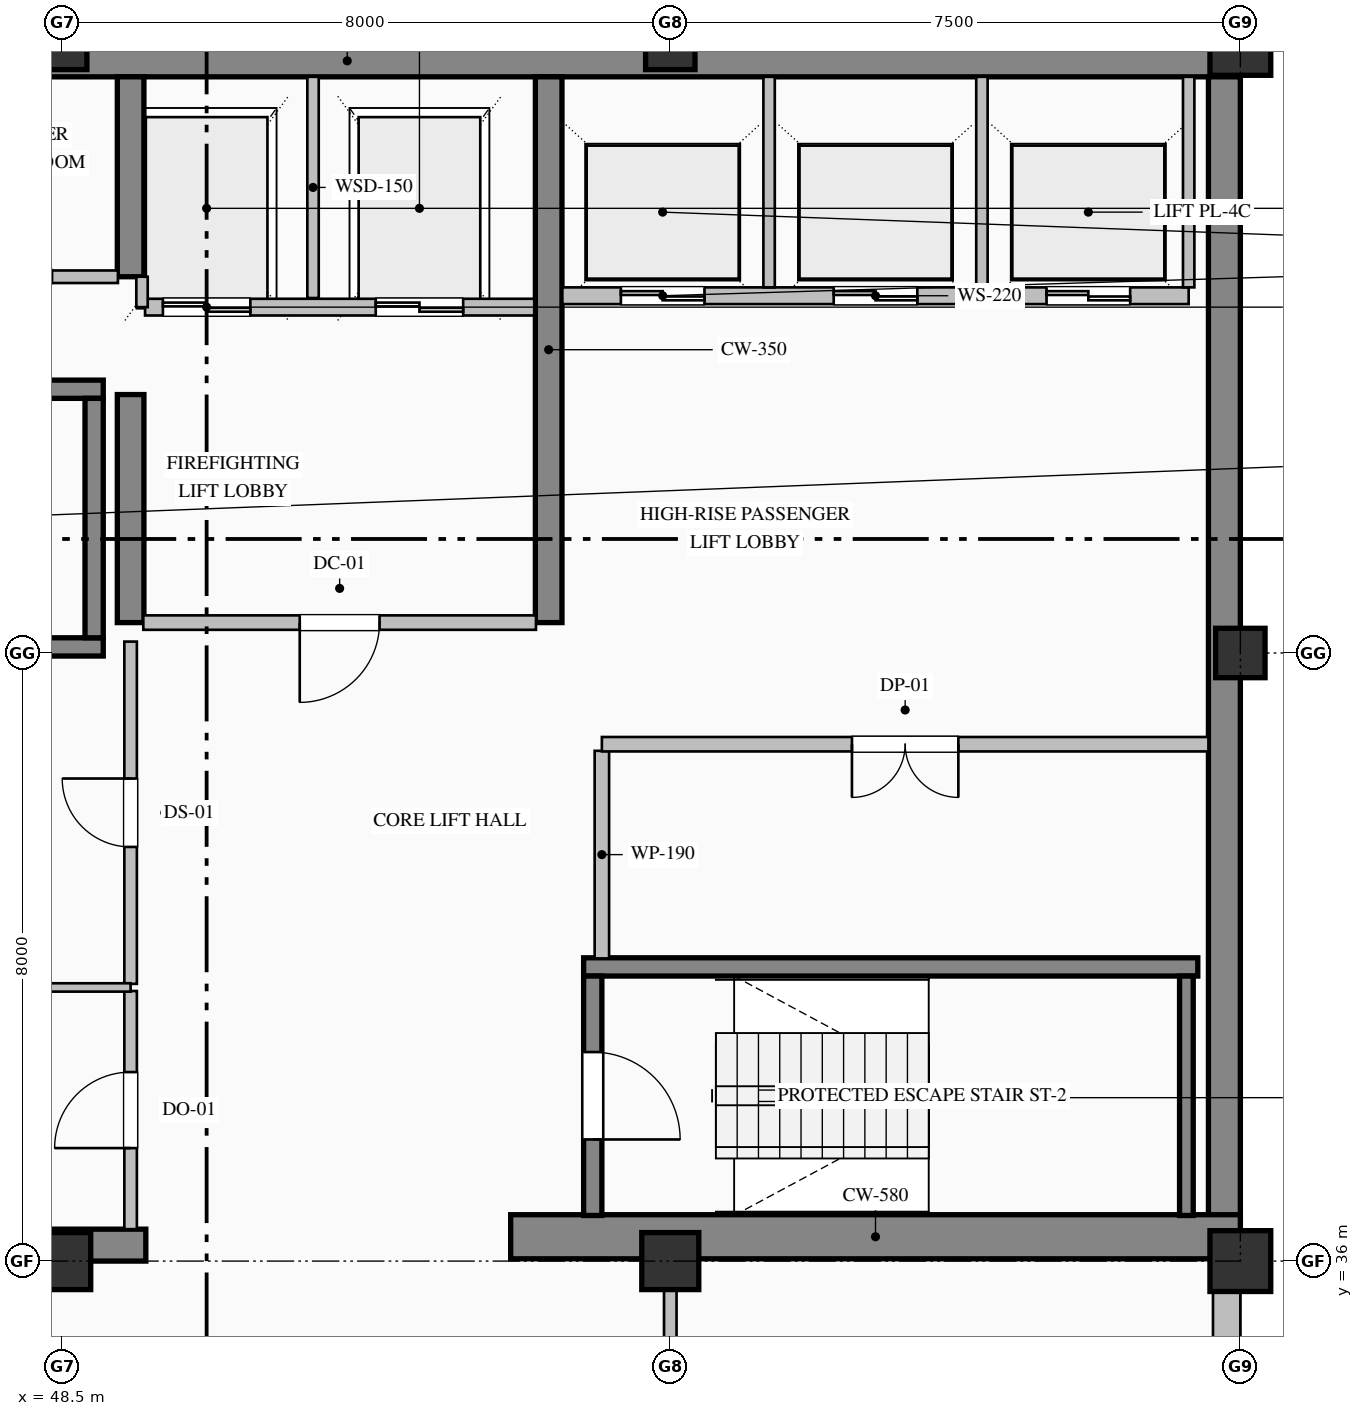
"""IFC4 building model, lengths in metres.
Left out: names, types, materials, properties, quantities, classifications, styles, units other than length and angle.
Written with IfcOpenShell. Run it as: python <this file> out.ifc"""

import sys

from ifc_helpers import new_model, si_unit, direction, frame, frame_2d, origin, origin_2d, place, context, subcontext, project, spatial, rectangle, hollow_rectangle, extrude, element, fill, save


model = new_model("IFC4")
c1 = context("Model", 3, precision=1e-05, world=origin(), true_north=direction((0.0, 1.0)))
c2 = subcontext(c1, "Body", "Model", "MODEL_VIEW")
j1 = project(units=[si_unit("LENGTHUNIT", "METRE"), si_unit("PLANEANGLEUNIT", "RADIAN")], contexts=[c1])
p1 = place(None, origin())
s1 = spatial("IfcSite", under=j1, at=p1, CompositionType="ELEMENT")
p2 = place(p1, origin())
s2 = spatial("IfcBuilding", under=s1, at=p2, CompositionType="ELEMENT")
p3 = place(p2, frame((0.0, 0.0, 319.2)))
s3 = spatial("IfcBuildingStorey", under=s2, at=p3, CompositionType="ELEMENT", Elevation=319.2)
p4 = place(p3, frame((40.5, 51.79, 0.0), z_axis=(0.0, 0.0, 1.0), x_axis=(1.0, 0.0, 0.0)))
e1 = element("IfcWall", 1, at=p4, inside=s3, PredefinedType="SHEAR", context=c2, shape_type="SweptSolid", body=[
    extrude(rectangle(XDim=23.5, YDim=0.42, at=frame_2d((11.75, 0.0))), origin(), (0.0, 0.0, 1.0), 3.785),
])
p5 = place(p3, frame((63.79, 36.32, 0.0), z_axis=(0.0, 0.0, 1.0), x_axis=(0.0, 1.0, 0.0)))
e2 = element("IfcWall", 2, at=p5, inside=s3, PredefinedType="SHEAR", context=c2, shape_type="SweptSolid", body=[
    extrude(rectangle(XDim=15.26, YDim=0.42, at=frame_2d((7.63, 0.0))), origin(), (0.0, 0.0, 1.0), 3.785),
])
p6 = place(p3, frame((40.5, 36.21, 0.0), z_axis=(0.0, 0.0, 1.0), x_axis=(1.0, 0.0, 0.0)))
e3 = element("IfcWall", 3, at=p6, inside=s3, PredefinedType="SHEAR", context=c2, shape_type="SweptSolid", body=[
    extrude(rectangle(XDim=9.1, YDim=0.42, at=frame_2d((4.55, 0.0))), origin(), (0.0, 0.0, 1.0), 3.785),
])
p7 = place(p3, frame((54.4, 36.32, 0.0), z_axis=(0.0, 0.0, 1.0), x_axis=(1.0, 0.0, 0.0)))
e4 = element("IfcWall", 4, at=p7, inside=s3, PredefinedType="SHEAR", context=c2, shape_type="SweptSolid", body=[
    extrude(rectangle(XDim=9.6, YDim=0.58, at=frame_2d((4.8, 0.0))), origin(), (0.0, 0.0, 1.0), 4.0),
])
p8 = place(p3, frame((49.4, 44.4, 0.0), z_axis=(0.0, 0.0, 1.0), x_axis=(0.0, 1.0, 0.0)))
e5 = element("IfcWall", 5, at=p8, inside=s3, PredefinedType="SHEAR", context=c2, shape_type="SweptSolid", body=[
    extrude(rectangle(XDim=3.0, YDim=0.35, at=frame_2d((1.5, 0.0))), origin(), (0.0, 0.0, 1.0), 3.785),
])
p9 = place(p3, frame((49.4, 48.95, 0.0), z_axis=(0.0, 0.0, 1.0), x_axis=(0.0, 1.0, 0.0)))
e6 = element("IfcWall", 6, at=p9, inside=s3, PredefinedType="SHEAR", context=c2, shape_type="SweptSolid", body=[
    extrude(rectangle(XDim=2.63, YDim=0.35, at=frame_2d((1.315, 0.0))), origin(), (0.0, 0.0, 1.0), 3.785),
])
p10 = place(p3, frame((54.9, 44.4, 0.0), z_axis=(0.0, 0.0, 1.0), x_axis=(0.0, 1.0, 0.0)))
e7 = element("IfcWall", 7, at=p10, inside=s3, PredefinedType="SHEAR", context=c2, shape_type="SweptSolid", body=[
    extrude(rectangle(XDim=7.18, YDim=0.35, at=frame_2d((3.59, 0.0))), origin(), (0.0, 0.0, 1.0), 3.785),
])
p11 = place(p3, frame((48.5, 36.0, 0.0), z_axis=(0.0, 0.0, 1.0), x_axis=(1.0, 0.0, 0.0)))
e8 = element("IfcColumn", 8, at=p11, inside=s3, PredefinedType="COLUMN", context=c2, shape_type="SweptSolid", body=[
    extrude(rectangle(XDim=0.75, YDim=0.75, at=origin_2d()), origin(), (0.0, 0.0, 1.0), 4.0),
])
p12 = place(p3, frame((48.5, 52.0, 0.0), z_axis=(0.0, 0.0, 1.0), x_axis=(1.0, 0.0, 0.0)))
e9 = element("IfcColumn", 9, at=p12, inside=s3, PredefinedType="COLUMN", context=c2, shape_type="SweptSolid", body=[
    extrude(hollow_rectangle(XDim=0.65, YDim=0.65, WallThickness=0.028, at=origin_2d()), origin(), (0.0, 0.0, 1.0), 4.0),
])
p13 = place(p3, frame((56.5, 36.0, 0.0), z_axis=(0.0, 0.0, 1.0), x_axis=(1.0, 0.0, 0.0)))
e10 = element("IfcColumn", 10, at=p13, inside=s3, PredefinedType="COLUMN", context=c2, shape_type="SweptSolid", body=[
    extrude(rectangle(XDim=0.75, YDim=0.75, at=origin_2d()), origin(), (0.0, 0.0, 1.0), 4.0),
])
p14 = place(p3, frame((56.5, 52.0, 0.0), z_axis=(0.0, 0.0, 1.0), x_axis=(1.0, 0.0, 0.0)))
e11 = element("IfcColumn", 11, at=p14, inside=s3, PredefinedType="COLUMN", context=c2, shape_type="SweptSolid", body=[
    extrude(hollow_rectangle(XDim=0.65, YDim=0.65, WallThickness=0.028, at=origin_2d()), origin(), (0.0, 0.0, 1.0), 4.0),
])
p15 = place(p3, frame((64.0, 36.0, 0.0), z_axis=(0.0, 0.0, 1.0), x_axis=(1.0, 0.0, 0.0)))
e12 = element("IfcColumn", 12, at=p15, inside=s3, PredefinedType="COLUMN", context=c2, shape_type="SweptSolid", body=[
    extrude(hollow_rectangle(XDim=0.8, YDim=0.8, WallThickness=0.032, at=origin_2d()), origin(), (0.0, 0.0, 1.0), 4.0),
])
p16 = place(p3, frame((64.0, 44.0, 0.0), z_axis=(0.0, 0.0, 1.0), x_axis=(1.0, 0.0, 0.0)))
e13 = element("IfcColumn", 13, at=p16, inside=s3, PredefinedType="COLUMN", context=c2, shape_type="SweptSolid", body=[
    extrude(hollow_rectangle(XDim=0.65, YDim=0.65, WallThickness=0.028, at=origin_2d()), origin(), (0.0, 0.0, 1.0), 4.0),
])
p17 = place(p3, frame((64.0, 52.0, 0.0), z_axis=(0.0, 0.0, 1.0), x_axis=(1.0, 0.0, 0.0)))
e14 = element("IfcColumn", 14, at=p17, inside=s3, PredefinedType="COLUMN", context=c2, shape_type="SweptSolid", body=[
    extrude(hollow_rectangle(XDim=0.8, YDim=0.8, WallThickness=0.032, at=origin_2d()), origin(), (0.0, 0.0, 1.0), 4.0),
])
p18 = place(p3, frame((63.82, 36.05, 0.0), z_axis=(0.0, 0.0, 1.0), x_axis=(0.0, -1.0, 0.0)))
e15 = element("IfcWall", 15, at=p18, inside=s3, PredefinedType="SOLIDWALL", context=c2, shape_type="SweptSolid", body=[
    extrude(rectangle(XDim=13.55, YDim=0.36, at=frame_2d((6.775, 0.0))), origin(), (0.0, 0.0, 1.0), 3.335),
])
p19 = place(p18, frame((2.925, 0.0, 0.9)))
e16 = element("IfcOpeningElement", 16, at=p19, cuts=e15, PredefinedType="OPENING", context=c2, shape_type="SweptSolid", body=[
    extrude(rectangle(XDim=1.35, YDim=1.85, at=frame_2d((0.675, 0.925))), frame((0.0, 0.19, 0.0), z_axis=(0.0, -1.0, 0.0), x_axis=(1.0, 0.0, 0.0)), (0.0, 0.0, 1.0), 0.38),
])
for number, where, z_axis, x_axis in (
    (17, (40.96, 47.47, 0.0), (0.0, 0.0, 1.0), (1.0, 0.0, 0.0)),
    (18, (49.04, 44.08, 0.0), (0.0, 0.0, 1.0), (-1.0, 0.0, 0.0)),
):
    element("IfcWall", number, at=place(p3, frame(where, z_axis=z_axis, x_axis=x_axis)), inside=s3, PredefinedType="SOLIDWALL", context=c2, shape_type="SweptSolid", body=[
        extrude(rectangle(XDim=8.08, YDim=0.24, at=frame_2d((4.04, 0.0))), origin(), (0.0, 0.0, 1.0), 4.0),
    ])
p20 = place(p3, frame((48.92, 44.2, 0.0), z_axis=(0.0, 0.0, 1.0), x_axis=(0.0, 1.0, 0.0)))
e19 = element("IfcWall", 19, at=p20, inside=s3, PredefinedType="SOLIDWALL", context=c2, shape_type="SweptSolid", body=[
    extrude(rectangle(XDim=3.15, YDim=0.24, at=frame_2d((1.575, 0.0))), origin(), (0.0, 0.0, 1.0), 4.0),
])
p21 = place(p3, frame((55.36, 39.87, 0.0), z_axis=(0.0, 0.0, 1.0), x_axis=(1.0, 0.0, 0.0)))
e20 = element("IfcWall", 20, at=p21, inside=s3, PredefinedType="SOLIDWALL", context=c2, shape_type="SweptSolid", body=[
    extrude(rectangle(XDim=8.08, YDim=0.24, at=frame_2d((4.04, 0.0))), origin(), (0.0, 0.0, 1.0), 4.0),
])
p22 = place(p3, frame((55.48, 39.75, 0.0), z_axis=(0.0, 0.0, 1.0), x_axis=(0.0, -1.0, 0.0)))
e21 = element("IfcWall", 21, at=p22, inside=s3, PredefinedType="SOLIDWALL", context=c2, shape_type="SweptSolid", body=[
    extrude(rectangle(XDim=3.15, YDim=0.24, at=frame_2d((1.575, 0.0))), origin(), (0.0, 0.0, 1.0), 4.0),
])
p23 = place(p22, frame((1.0, 0.0, 0.0)))
e22 = element("IfcOpeningElement", 22, at=p23, cuts=e21, PredefinedType="OPENING", context=c2, shape_type="SweptSolid", body=[
    extrude(rectangle(XDim=1.15, YDim=2.2, at=frame_2d((0.575, 1.1))), frame((0.0, 0.13, 0.0), z_axis=(0.0, -1.0, 0.0), x_axis=(1.0, 0.0, 0.0)), (0.0, 0.0, 1.0), 0.26),
])
p24 = place(p3, frame((63.29, 36.6, 0.0), z_axis=(0.0, 0.0, 1.0), x_axis=(0.0, 1.0, 0.0)))
e23 = element("IfcWall", 23, at=p24, inside=s3, PredefinedType="SOLIDWALL", context=c2, shape_type="SweptSolid", body=[
    extrude(rectangle(XDim=3.15, YDim=0.18, at=frame_2d((1.575, 0.0))), origin(), (0.0, 0.0, 1.0), 4.0),
])
p25 = place(p3, frame((54.71, 48.55, 0.0), z_axis=(0.0, 0.0, 1.0), x_axis=(-1.0, 0.0, 0.0)))
e24 = element("IfcWall", 24, at=p25, inside=s3, PredefinedType="PARTITIONING", context=c2, shape_type="SweptSolid", body=[
    extrude(rectangle(XDim=5.12, YDim=0.22, at=frame_2d((2.56, 0.0))), origin(), (0.0, 0.0, 1.0), 3.785),
])
p26 = place(p25, frame((3.735, 0.0, 0.0)))
e25 = element("IfcOpeningElement", 25, at=p26, cuts=e24, PredefinedType="OPENING", context=c2, shape_type="SweptSolid", body=[
    extrude(rectangle(XDim=1.15, YDim=2.2, at=frame_2d((0.575, 1.1))), frame((0.0, 0.12, 0.0), z_axis=(0.0, -1.0, 0.0), x_axis=(1.0, 0.0, 0.0)), (0.0, 0.0, 1.0), 0.24),
])
p27 = place(p25, frame((0.935, 0.0, 0.0)))
e26 = element("IfcOpeningElement", 26, at=p27, cuts=e24, PredefinedType="OPENING", context=c2, shape_type="SweptSolid", body=[
    extrude(rectangle(XDim=1.15, YDim=2.2, at=frame_2d((0.575, 1.1))), frame((0.0, 0.12, 0.0), z_axis=(0.0, -1.0, 0.0), x_axis=(1.0, 0.0, 0.0)), (0.0, 0.0, 1.0), 0.24),
])
p28 = place(p3, frame((51.8, 48.67, 0.0), z_axis=(0.0, 0.0, 1.0), x_axis=(0.0, 1.0, 0.0)))
e27 = element("IfcWall", 27, at=p28, inside=s3, PredefinedType="PARTITIONING", context=c2, shape_type="SweptSolid", body=[
    extrude(rectangle(XDim=2.91, YDim=0.15, at=frame_2d((1.455, 0.0))), origin(), (0.0, 0.0, 1.0), 3.785),
])
p29 = place(p3, frame((49.55, 48.55, 0.0), z_axis=(0.0, 0.0, 1.0), x_axis=(0.0, 1.0, 0.0)))
e28 = element("IfcWall", 28, at=p29, inside=s3, PredefinedType="PARTITIONING", context=c2, shape_type="SweptSolid", body=[
    extrude(rectangle(XDim=0.4, YDim=0.15, at=frame_2d((0.2, 0.0))), origin(), (0.0, 0.0, 1.0), 3.785),
])
p30 = place(p3, frame((63.32, 48.7, 0.0), z_axis=(0.0, 0.0, 1.0), x_axis=(-1.0, 0.0, 0.0)))
e29 = element("IfcWall", 29, at=p30, inside=s3, PredefinedType="PARTITIONING", context=c2, shape_type="SweptSolid", body=[
    extrude(rectangle(XDim=8.24, YDim=0.22, at=frame_2d((4.12, 0.0))), origin(), (0.0, 0.0, 1.0), 3.785),
])
p31 = place(p30, frame((6.37, 0.0, 0.0)))
e30 = element("IfcOpeningElement", 30, at=p31, cuts=e29, PredefinedType="OPENING", context=c2, shape_type="SweptSolid", body=[
    extrude(rectangle(XDim=1.1, YDim=2.2, at=frame_2d((0.55, 1.1))), frame((0.0, 0.12, 0.0), z_axis=(0.0, -1.0, 0.0), x_axis=(1.0, 0.0, 0.0)), (0.0, 0.0, 1.0), 0.24),
])
p32 = place(p30, frame((3.57, 0.0, 0.0)))
e31 = element("IfcOpeningElement", 31, at=p32, cuts=e29, PredefinedType="OPENING", context=c2, shape_type="SweptSolid", body=[
    extrude(rectangle(XDim=1.1, YDim=2.2, at=frame_2d((0.55, 1.1))), frame((0.0, 0.12, 0.0), z_axis=(0.0, -1.0, 0.0), x_axis=(1.0, 0.0, 0.0)), (0.0, 0.0, 1.0), 0.24),
])
p33 = place(p30, frame((0.77, 0.0, 0.0)))
e32 = element("IfcOpeningElement", 32, at=p33, cuts=e29, PredefinedType="OPENING", context=c2, shape_type="SweptSolid", body=[
    extrude(rectangle(XDim=1.1, YDim=2.2, at=frame_2d((0.55, 1.1))), frame((0.0, 0.12, 0.0), z_axis=(0.0, -1.0, 0.0), x_axis=(1.0, 0.0, 0.0)), (0.0, 0.0, 1.0), 0.24),
])
for number, where, z_axis, x_axis in (
    (33, (57.8, 48.81, 0.0), (0.0, 0.0, 1.0), (0.0, 1.0, 0.0)),
    (34, (60.6, 48.81, 0.0), (0.0, 0.0, 1.0), (0.0, 1.0, 0.0)),
    (35, (63.32, 48.81, 0.0), (0.0, 0.0, 1.0), (0.0, 1.0, 0.0)),
):
    element("IfcWall", number, at=place(p3, frame(where, z_axis=z_axis, x_axis=x_axis)), inside=s3, PredefinedType="PARTITIONING", context=c2, shape_type="SweptSolid", body=[
        extrude(rectangle(XDim=2.77, YDim=0.15, at=frame_2d((1.385, 0.0))), origin(), (0.0, 0.0, 1.0), 3.785),
    ])
p34 = place(p3, frame((46.6, 48.95, 0.0), z_axis=(0.0, 0.0, 1.0), x_axis=(1.0, 0.0, 0.0)))
e36 = element("IfcWall", 36, at=p34, inside=s3, PredefinedType="PARTITIONING", context=c2, shape_type="SweptSolid", body=[
    extrude(rectangle(XDim=2.633, YDim=0.165, at=frame_2d((1.316, 0.0))), origin(), (0.0, 0.0, 1.0), 3.785),
])
p35 = place(p34, frame((0.866, 0.0, 0.0)))
e37 = element("IfcOpeningElement", 37, at=p35, cuts=e36, PredefinedType="OPENING", context=c2, shape_type="SweptSolid", body=[
    extrude(rectangle(XDim=0.9, YDim=2.15, at=frame_2d((0.45, 1.075))), frame((0.0, 0.093, 0.0), z_axis=(0.0, -1.0, 0.0), x_axis=(1.0, 0.0, 0.0)), (0.0, 0.0, 1.0), 0.185),
])
p36 = place(p3, frame((54.733, 44.4, 0.0), z_axis=(0.0, 0.0, 1.0), x_axis=(-1.0, 0.0, 0.0)))
e38 = element("IfcWall", 38, at=p36, inside=s3, PredefinedType="PARTITIONING", context=c2, shape_type="SweptSolid", body=[
    extrude(rectangle(XDim=5.166, YDim=0.19, at=frame_2d((2.583, 0.0))), origin(), (0.0, 0.0, 1.0), 3.785),
])
p37 = place(p36, frame((2.058, 0.0, 0.0)))
e39 = element("IfcOpeningElement", 39, at=p37, cuts=e38, PredefinedType="OPENING", context=c2, shape_type="SweptSolid", body=[
    extrude(rectangle(XDim=1.05, YDim=2.15, at=frame_2d((0.525, 1.075))), frame((0.0, 0.105, 0.0), z_axis=(0.0, -1.0, 0.0), x_axis=(1.0, 0.0, 0.0)), (0.0, 0.0, 1.0), 0.21),
])
p38 = place(p3, frame((49.4, 36.42, 0.0), z_axis=(0.0, 0.0, 1.0), x_axis=(0.0, 1.0, 0.0)))
e40 = element("IfcWall", 40, at=p38, inside=s3, PredefinedType="PARTITIONING", context=c2, shape_type="SweptSolid", body=[
    extrude(rectangle(XDim=3.133, YDim=0.165, at=frame_2d((1.566, 0.0))), origin(), (0.0, 0.0, 1.0), 3.027),
])
p39 = place(p38, frame((1.066, 0.0, 0.0)))
e41 = element("IfcOpeningElement", 41, at=p39, cuts=e40, PredefinedType="OPENING", context=c2, shape_type="SweptSolid", body=[
    extrude(rectangle(XDim=1.0, YDim=2.15, at=frame_2d((0.5, 1.075))), frame((0.0, 0.093, 0.0), z_axis=(0.0, -1.0, 0.0), x_axis=(1.0, 0.0, 0.0)), (0.0, 0.0, 1.0), 0.185),
])
p40 = place(p3, frame((49.4, 39.647, 0.0), z_axis=(0.0, 0.0, 1.0), x_axis=(0.0, 1.0, 0.0)))
e42 = element("IfcWall", 42, at=p40, inside=s3, PredefinedType="PARTITIONING", context=c2, shape_type="SweptSolid", body=[
    extrude(rectangle(XDim=4.503, YDim=0.165, at=frame_2d((2.251, 0.0))), origin(), (0.0, 0.0, 1.0), 3.027),
])
p41 = place(p40, frame((1.802, 0.0, 0.0)))
e43 = element("IfcOpeningElement", 43, at=p41, cuts=e42, PredefinedType="OPENING", context=c2, shape_type="SweptSolid", body=[
    extrude(rectangle(XDim=0.9, YDim=2.15, at=frame_2d((0.45, 1.075))), frame((0.0, 0.093, 0.0), z_axis=(0.0, -1.0, 0.0), x_axis=(1.0, 0.0, 0.0)), (0.0, 0.0, 1.0), 0.185),
])
p42 = place(p3, frame((55.6, 42.713, 0.0), z_axis=(0.0, 0.0, 1.0), x_axis=(0.0, -1.0, 0.0)))
e44 = element("IfcWall", 44, at=p42, inside=s3, PredefinedType="PARTITIONING", context=c2, shape_type="SweptSolid", body=[
    extrude(rectangle(XDim=2.731, YDim=0.19, at=frame_2d((1.365, 0.0))), origin(), (0.0, 0.0, 1.0), 3.785),
])
p43 = place(p3, frame((40.92, 39.6, 0.0), z_axis=(0.0, 0.0, 1.0), x_axis=(1.0, 0.0, 0.0)))
e45 = element("IfcWall", 45, at=p43, inside=s3, PredefinedType="MOVABLE", context=c2, shape_type="SweptSolid", body=[
    extrude(rectangle(XDim=8.48, YDim=0.11, at=frame_2d((4.24, 0.0))), origin(), (0.0, 0.0, 1.0), 3.785),
])
p44 = place(p3, frame((63.58, 42.8, 0.0), z_axis=(0.0, 0.0, 1.0), x_axis=(-1.0, 0.0, 0.0)))
e46 = element("IfcWall", 46, at=p44, inside=s3, PredefinedType="PARTITIONING", context=c2, shape_type="SweptSolid", body=[
    extrude(rectangle(XDim=7.98, YDim=0.19, at=frame_2d((3.99, 0.0))), origin(), (0.0, 0.0, 1.0), 3.785),
])
p45 = place(p44, frame((3.29, 0.0, 0.0)))
e47 = element("IfcOpeningElement", 47, at=p45, cuts=e46, PredefinedType="OPENING", context=c2, shape_type="SweptSolid", body=[
    extrude(rectangle(XDim=1.4, YDim=2.25, at=frame_2d((0.7, 1.125))), frame((0.0, 0.105, 0.0), z_axis=(0.0, -1.0, 0.0), x_axis=(1.0, 0.0, 0.0)), (0.0, 0.0, 1.0), 0.21),
])
p46 = place(p3, frame((56.5, 36.0, 0.0), z_axis=(0.0, 0.0, 1.0), x_axis=(0.0, -1.0, 0.0)))
e48 = element("IfcWall", 48, at=p46, inside=s3, PredefinedType="PARTITIONING", context=c2, shape_type="SweptSolid", body=[
    extrude(rectangle(XDim=2.325, YDim=0.165, at=frame_2d((1.163, 0.0))), origin(), (0.0, 0.0, 1.0), 3.177),
])
p47 = place(p23, origin())
e49 = element("IfcDoor", 49, at=p47, inside=s3, OperationType="SINGLE_SWING_RIGHT", PredefinedType="DOOR", context=c2, shape_type="SweptSolid", body=[
    extrude(rectangle(XDim=1.15, YDim=2.2, at=frame_2d((0.575, 1.1))), frame((0.0, 0.025, 0.0), z_axis=(0.0, -1.0, 0.0), x_axis=(1.0, 0.0, 0.0)), (0.0, 0.0, 1.0), 0.05),
])
fill(e22, e49)
p48 = place(p26, origin())
e50 = element("IfcDoor", 50, at=p48, inside=s3, OperationType="DOUBLE_DOOR_SLIDING", PredefinedType="DOOR", context=c2, shape_type="SweptSolid", body=[
    extrude(rectangle(XDim=1.15, YDim=2.2, at=frame_2d((0.575, 1.1))), frame((0.0, 0.025, 0.0), z_axis=(0.0, -1.0, 0.0), x_axis=(1.0, 0.0, 0.0)), (0.0, 0.0, 1.0), 0.05),
])
fill(e25, e50)
p49 = place(p27, origin())
e51 = element("IfcDoor", 51, at=p49, inside=s3, OperationType="DOUBLE_DOOR_SLIDING", PredefinedType="DOOR", context=c2, shape_type="SweptSolid", body=[
    extrude(rectangle(XDim=1.15, YDim=2.2, at=frame_2d((0.575, 1.1))), frame((0.0, 0.025, 0.0), z_axis=(0.0, -1.0, 0.0), x_axis=(1.0, 0.0, 0.0)), (0.0, 0.0, 1.0), 0.05),
])
fill(e26, e51)
p50 = place(p31, origin())
e52 = element("IfcDoor", 52, at=p50, inside=s3, OperationType="DOUBLE_DOOR_SLIDING", PredefinedType="DOOR", context=c2, shape_type="SweptSolid", body=[
    extrude(rectangle(XDim=1.1, YDim=2.2, at=frame_2d((0.55, 1.1))), frame((0.0, 0.025, 0.0), z_axis=(0.0, -1.0, 0.0), x_axis=(1.0, 0.0, 0.0)), (0.0, 0.0, 1.0), 0.05),
])
fill(e30, e52)
p51 = place(p32, origin())
e53 = element("IfcDoor", 53, at=p51, inside=s3, OperationType="DOUBLE_DOOR_SLIDING", PredefinedType="DOOR", context=c2, shape_type="SweptSolid", body=[
    extrude(rectangle(XDim=1.1, YDim=2.2, at=frame_2d((0.55, 1.1))), frame((0.0, 0.025, 0.0), z_axis=(0.0, -1.0, 0.0), x_axis=(1.0, 0.0, 0.0)), (0.0, 0.0, 1.0), 0.05),
])
fill(e31, e53)
p52 = place(p33, origin())
e54 = element("IfcDoor", 54, at=p52, inside=s3, OperationType="DOUBLE_DOOR_SLIDING", PredefinedType="DOOR", context=c2, shape_type="SweptSolid", body=[
    extrude(rectangle(XDim=1.1, YDim=2.2, at=frame_2d((0.55, 1.1))), frame((0.0, 0.025, 0.0), z_axis=(0.0, -1.0, 0.0), x_axis=(1.0, 0.0, 0.0)), (0.0, 0.0, 1.0), 0.05),
])
fill(e32, e54)
p53 = place(p37, origin())
e55 = element("IfcDoor", 55, at=p53, inside=s3, OperationType="SINGLE_SWING_RIGHT", PredefinedType="DOOR", context=c2, shape_type="SweptSolid", body=[
    extrude(rectangle(XDim=1.05, YDim=2.15, at=frame_2d((0.525, 1.075))), frame((0.0, 0.025, 0.0), z_axis=(0.0, -1.0, 0.0), x_axis=(1.0, 0.0, 0.0)), (0.0, 0.0, 1.0), 0.05),
])
fill(e39, e55)
p54 = place(p39, origin())
e56 = element("IfcDoor", 56, at=p54, inside=s3, OperationType="SINGLE_SWING_LEFT", PredefinedType="DOOR", context=c2, shape_type="SweptSolid", body=[
    extrude(rectangle(XDim=1.0, YDim=2.15, at=frame_2d((0.5, 1.075))), frame((0.0, 0.025, 0.0), z_axis=(0.0, -1.0, 0.0), x_axis=(1.0, 0.0, 0.0)), (0.0, 0.0, 1.0), 0.05),
])
fill(e41, e56)
p55 = place(p41, origin())
e57 = element("IfcDoor", 57, at=p55, inside=s3, OperationType="SINGLE_SWING_RIGHT", PredefinedType="DOOR", context=c2, shape_type="SweptSolid", body=[
    extrude(rectangle(XDim=0.9, YDim=2.15, at=frame_2d((0.45, 1.075))), frame((0.0, 0.025, 0.0), z_axis=(0.0, -1.0, 0.0), x_axis=(1.0, 0.0, 0.0)), (0.0, 0.0, 1.0), 0.05),
])
fill(e43, e57)
p56 = place(p45, origin())
e58 = element("IfcDoor", 58, at=p56, inside=s3, OperationType="DOUBLE_DOOR_SINGLE_SWING", PredefinedType="DOOR", context=c2, shape_type="SweptSolid", body=[
    extrude(rectangle(XDim=1.4, YDim=2.25, at=frame_2d((0.7, 1.125))), frame((0.0, 0.025, 0.0), z_axis=(0.0, -1.0, 0.0), x_axis=(1.0, 0.0, 0.0)), (0.0, 0.0, 1.0), 0.05),
])
fill(e47, e58)
save(model, sys.argv[1])
